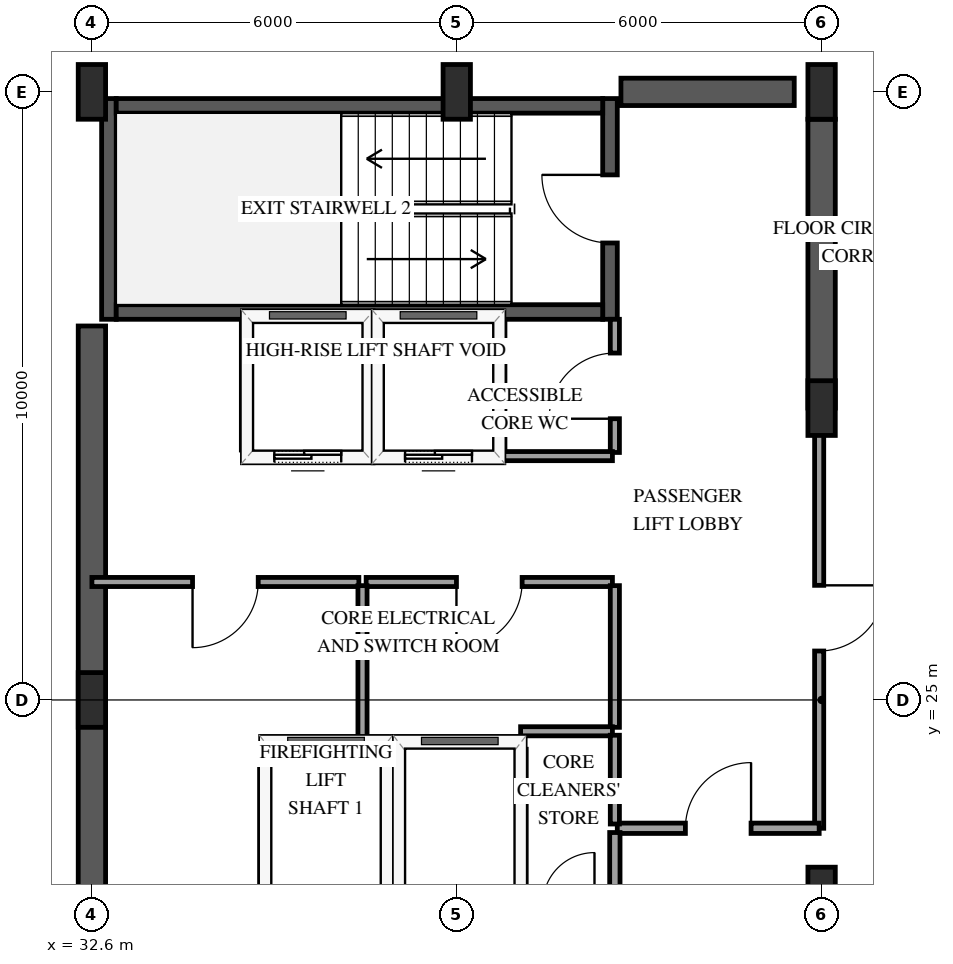
"""IFC4 building model, lengths in metres.
Left out: names, types, materials, properties, quantities, classifications, styles, units other than length and angle.
Written with IfcOpenShell. Run it as: python <this file> out.ifc"""

import sys

from ifc_helpers import new_model, si_unit, direction, frame, frame_2d, origin, origin_2d, place, context, subcontext, project, spatial, rectangle, extrude, element, fill, save


model = new_model("IFC4")
c1 = context("Model", 3, precision=1e-05, world=origin(), true_north=direction((0.0, 1.0)))
c2 = subcontext(c1, "Body", "Model", "MODEL_VIEW")
j1 = project(units=[si_unit("LENGTHUNIT", "METRE"), si_unit("PLANEANGLEUNIT", "RADIAN")], contexts=[c1])
p1 = place(None, origin())
s1 = spatial("IfcSite", under=j1, at=p1, CompositionType="ELEMENT")
p2 = place(p1, origin())
s2 = spatial("IfcBuilding", under=s1, at=p2, CompositionType="ELEMENT")
p3 = place(p2, frame((0.0, 0.0, 265.0)))
s3 = spatial("IfcBuildingStorey", under=s2, at=p3, CompositionType="ELEMENT", Elevation=265.0)
p4 = place(p3, frame((32.88, 31.26, 0.0), z_axis=(0.0, 0.0, 1.0), x_axis=(0.0, 1.0, 0.0)))
e1 = element("IfcWall", 1, at=p4, inside=s3, PredefinedType="SHEAR", context=c2, shape_type="SweptSolid", body=[
    extrude(rectangle(XDim=3.63, YDim=0.24, at=frame_2d((1.815, 0.0))), origin(), (0.0, 0.0, 1.0), 3.75),
])
p5 = place(p3, frame((41.12, 31.26, 0.0), z_axis=(0.0, 0.0, 1.0), x_axis=(0.0, 1.0, 0.0)))
e2 = element("IfcWall", 2, at=p5, inside=s3, PredefinedType="SHEAR", context=c2, shape_type="SweptSolid", body=[
    extrude(rectangle(XDim=3.63, YDim=0.24, at=frame_2d((1.815, 0.0))), origin(), (0.0, 0.0, 1.0), 3.75),
])
p6 = place(p5, frame((1.255, 0.0, 0.0)))
e3 = element("IfcOpeningElement", 3, at=p6, cuts=e2, PredefinedType="OPENING", context=c2, shape_type="SweptSolid", body=[
    extrude(rectangle(XDim=1.12, YDim=2.15, at=frame_2d((0.56, 1.075))), frame((0.0, 0.13, 0.0), z_axis=(0.0, -1.0, 0.0), x_axis=(1.0, 0.0, 0.0)), (0.0, 0.0, 1.0), 0.26),
])
for number, where, z_axis, x_axis in (
    (4, (33.0, 31.38, 0.0), (0.0, 0.0, 1.0), (1.0, 0.0, 0.0)),
    (5, (33.0, 34.77, 0.0), (0.0, 0.0, 1.0), (1.0, 0.0, 0.0)),
):
    element("IfcWall", number, at=place(p3, frame(where, z_axis=z_axis, x_axis=x_axis)), inside=s3, PredefinedType="SHEAR", context=c2, shape_type="SweptSolid", body=[
        extrude(rectangle(XDim=8.0, YDim=0.24, at=frame_2d((4.0, 0.0))), origin(), (0.0, 0.0, 1.0), 3.75),
    ])
p7 = place(p3, frame((32.6, 18.85, 0.0), z_axis=(0.0, 0.0, 1.0), x_axis=(0.0, 1.0, 0.0)))
e6 = element("IfcWall", 6, at=p7, inside=s3, PredefinedType="SHEAR", context=c2, shape_type="SweptSolid", body=[
    extrude(rectangle(XDim=12.3, YDim=0.45, at=frame_2d((6.15, 0.0))), origin(), (0.0, 0.0, 1.0), 3.75),
])
p8 = place(p3, frame((41.3, 35.0, 0.0), z_axis=(0.0, 0.0, 1.0), x_axis=(1.0, 0.0, 0.0)))
e7 = element("IfcWall", 7, at=p8, inside=s3, PredefinedType="SHEAR", context=c2, shape_type="SweptSolid", body=[
    extrude(rectangle(XDim=2.85, YDim=0.45, at=frame_2d((1.425, 0.0))), origin(), (0.0, 0.0, 1.0), 3.75),
])
p9 = place(p3, frame((44.6, 29.8, 0.0), z_axis=(0.0, 0.0, 1.0), x_axis=(0.0, 1.0, 0.0)))
e8 = element("IfcWall", 8, at=p9, inside=s3, PredefinedType="SHEAR", context=c2, shape_type="SweptSolid", body=[
    extrude(rectangle(XDim=4.75, YDim=0.45, at=frame_2d((2.375, 0.0))), origin(), (0.0, 0.0, 1.0), 3.75),
])
for number, where, z_axis, x_axis in (
    (9, (32.6, 25.0, 0.0), (0.0, 0.0, 1.0), (1.0, 0.0, 0.0)),
    (10, (32.6, 35.0, 0.0), (0.0, 0.0, 1.0), (1.0, 0.0, 0.0)),
    (11, (38.6, 35.0, 0.0), (0.0, 0.0, 1.0), (1.0, 0.0, 0.0)),
    (12, (44.6, 21.8, 0.0), (0.0, 0.0, 1.0), (1.0, 0.0, 0.0)),
    (13, (44.6, 29.8, 0.0), (0.0, 0.0, 1.0), (1.0, 0.0, 0.0)),
    (14, (44.6, 35.0, 0.0), (0.0, 0.0, 1.0), (1.0, 0.0, 0.0)),
):
    element("IfcColumn", number, at=place(p3, frame(where, z_axis=z_axis, x_axis=x_axis)), inside=s3, PredefinedType="PILASTER", context=c2, shape_type="SweptSolid", body=[
        extrude(rectangle(XDim=0.45, YDim=0.9, at=origin_2d()), origin(), (0.0, 0.0, 1.0), 3.75),
    ])
p10 = place(p3, frame((35.45, 24.3, 0.0), z_axis=(0.0, 0.0, 1.0), x_axis=(1.0, 0.0, 0.0)))
e15 = element("IfcWall", 15, at=p10, inside=s3, PredefinedType="SOLIDWALL", context=c2, shape_type="SweptSolid", body=[
    extrude(rectangle(XDim=2.0, YDim=0.185, at=frame_2d((1.0, 0.0))), origin(), (0.0, 0.0, 1.0), 3.45),
])
for number, where, z_axis, x_axis in (
    (16, (35.45, 21.81, 0.0), (0.0, 0.0, 1.0), (0.0, 1.0, 0.0)),
    (17, (37.45, 21.81, 0.0), (0.0, 0.0, 1.0), (0.0, 1.0, 0.0)),
):
    element("IfcWall", number, at=place(p3, frame(where, z_axis=z_axis, x_axis=x_axis)), inside=s3, PredefinedType="SOLIDWALL", context=c2, shape_type="SweptSolid", body=[
        extrude(rectangle(XDim=2.38, YDim=0.185, at=frame_2d((1.19, 0.0))), origin(), (0.0, 0.0, 1.0), 3.45),
    ])
p11 = place(p3, frame((37.65, 24.3, 0.0), z_axis=(0.0, 0.0, 1.0), x_axis=(1.0, 0.0, 0.0)))
e18 = element("IfcWall", 18, at=p11, inside=s3, PredefinedType="SOLIDWALL", context=c2, shape_type="SweptSolid", body=[
    extrude(rectangle(XDim=2.0, YDim=0.185, at=frame_2d((1.0, 0.0))), origin(), (0.0, 0.0, 1.0), 3.45),
])
p12 = place(p3, frame((39.65, 21.81, 0.0), z_axis=(0.0, 0.0, 1.0), x_axis=(0.0, 1.0, 0.0)))
e19 = element("IfcWall", 19, at=p12, inside=s3, PredefinedType="SOLIDWALL", context=c2, shape_type="SweptSolid", body=[
    extrude(rectangle(XDim=2.38, YDim=0.185, at=frame_2d((1.19, 0.0))), origin(), (0.0, 0.0, 1.0), 3.45),
])
p13 = place(p3, frame((35.15, 29.0, 0.0), z_axis=(0.0, 0.0, 1.0), x_axis=(1.0, 0.0, 0.0)))
e20 = element("IfcWall", 20, at=p13, inside=s3, PredefinedType="SOLIDWALL", context=c2, shape_type="SweptSolid", body=[
    extrude(rectangle(XDim=2.0, YDim=0.185, at=frame_2d((1.0, 0.0))), origin(), (0.0, 0.0, 1.0), 3.45),
])
p14 = place(p13, frame((0.45, 0.0, 0.0)))
e21 = element("IfcOpeningElement", 21, at=p14, cuts=e20, PredefinedType="OPENING", context=c2, shape_type="SweptSolid", body=[
    extrude(rectangle(XDim=1.1, YDim=2.15, at=frame_2d((0.55, 1.075))), frame((0.0, 0.103, 0.0), z_axis=(0.0, -1.0, 0.0), x_axis=(1.0, 0.0, 0.0)), (0.0, 0.0, 1.0), 0.205),
])
for number, where, z_axis, x_axis in (
    (22, (35.15, 29.11, 0.0), (0.0, 0.0, 1.0), (0.0, 1.0, 0.0)),
    (23, (37.15, 29.11, 0.0), (0.0, 0.0, 1.0), (0.0, 1.0, 0.0)),
):
    element("IfcWall", number, at=place(p3, frame(where, z_axis=z_axis, x_axis=x_axis)), inside=s3, PredefinedType="SOLIDWALL", context=c2, shape_type="SweptSolid", body=[
        extrude(rectangle(XDim=2.1, YDim=0.185, at=frame_2d((1.05, 0.0))), origin(), (0.0, 0.0, 1.0), 3.45),
    ])
p15 = place(p3, frame((37.3, 29.0, 0.0), z_axis=(0.0, 0.0, 1.0), x_axis=(1.0, 0.0, 0.0)))
e24 = element("IfcWall", 24, at=p15, inside=s3, PredefinedType="SOLIDWALL", context=c2, shape_type="SweptSolid", body=[
    extrude(rectangle(XDim=2.0, YDim=0.185, at=frame_2d((1.0, 0.0))), origin(), (0.0, 0.0, 1.0), 3.45),
])
p16 = place(p15, frame((0.45, 0.0, 0.0)))
e25 = element("IfcOpeningElement", 25, at=p16, cuts=e24, PredefinedType="OPENING", context=c2, shape_type="SweptSolid", body=[
    extrude(rectangle(XDim=1.1, YDim=2.15, at=frame_2d((0.55, 1.075))), frame((0.0, 0.103, 0.0), z_axis=(0.0, -1.0, 0.0), x_axis=(1.0, 0.0, 0.0)), (0.0, 0.0, 1.0), 0.205),
])
p17 = place(p3, frame((39.3, 29.11, 0.0), z_axis=(0.0, 0.0, 1.0), x_axis=(0.0, 1.0, 0.0)))
e26 = element("IfcWall", 26, at=p17, inside=s3, PredefinedType="SOLIDWALL", context=c2, shape_type="SweptSolid", body=[
    extrude(rectangle(XDim=2.1, YDim=0.185, at=frame_2d((1.05, 0.0))), origin(), (0.0, 0.0, 1.0), 3.45),
])
p18 = place(p3, frame((44.56, 29.8, 0.0), z_axis=(0.0, 0.0, 1.0), x_axis=(0.0, -1.0, 0.0)))
e27 = element("IfcWall", 27, at=p18, inside=s3, PredefinedType="PARTITIONING", context=c2, shape_type="SweptSolid", body=[
    extrude(rectangle(XDim=6.91, YDim=0.15, at=frame_2d((3.455, 0.0))), origin(), (0.0, 0.0, 1.0), 2.49),
])
p19 = place(p18, frame((2.915, 0.0, 0.0)))
e28 = element("IfcOpeningElement", 28, at=p19, cuts=e27, PredefinedType="OPENING", context=c2, shape_type="SweptSolid", body=[
    extrude(rectangle(XDim=1.08, YDim=2.15, at=frame_2d((0.54, 1.075))), frame((0.0, 0.085, 0.0), z_axis=(0.0, -1.0, 0.0), x_axis=(1.0, 0.0, 0.0)), (0.0, 0.0, 1.0), 0.17),
])
p20 = place(p3, frame((36.99, 26.94, 0.0), z_axis=(0.0, 0.0, 1.0), x_axis=(-1.0, 0.0, 0.0)))
e29 = element("IfcWall", 29, at=p20, inside=s3, PredefinedType="PARTITIONING", context=c2, shape_type="SweptSolid", body=[
    extrude(rectangle(XDim=4.39, YDim=0.15, at=frame_2d((2.195, 0.0))), origin(), (0.0, 0.0, 1.0), 3.45),
])
p21 = place(p20, frame((1.655, 0.0, 0.0)))
e30 = element("IfcOpeningElement", 30, at=p21, cuts=e29, PredefinedType="OPENING", context=c2, shape_type="SweptSolid", body=[
    extrude(rectangle(XDim=1.08, YDim=2.15, at=frame_2d((0.54, 1.075))), frame((0.0, 0.085, 0.0), z_axis=(0.0, -1.0, 0.0), x_axis=(1.0, 0.0, 0.0)), (0.0, 0.0, 1.0), 0.17),
])
p22 = place(p3, frame((41.16, 26.94, 0.0), z_axis=(0.0, 0.0, 1.0), x_axis=(-1.0, 0.0, 0.0)))
e31 = element("IfcWall", 31, at=p22, inside=s3, PredefinedType="PARTITIONING", context=c2, shape_type="SweptSolid", body=[
    extrude(rectangle(XDim=4.05, YDim=0.15, at=frame_2d((2.025, 0.0))), origin(), (0.0, 0.0, 1.0), 3.45),
])
p23 = place(p22, frame((1.485, 0.0, 0.0)))
e32 = element("IfcOpeningElement", 32, at=p23, cuts=e31, PredefinedType="OPENING", context=c2, shape_type="SweptSolid", body=[
    extrude(rectangle(XDim=1.08, YDim=2.15, at=frame_2d((0.54, 1.075))), frame((0.0, 0.085, 0.0), z_axis=(0.0, -1.0, 0.0), x_axis=(1.0, 0.0, 0.0)), (0.0, 0.0, 1.0), 0.17),
])
p24 = place(p3, frame((41.24, 22.89, 0.0), z_axis=(0.0, 0.0, 1.0), x_axis=(1.0, 0.0, 0.0)))
e33 = element("IfcWall", 33, at=p24, inside=s3, PredefinedType="PARTITIONING", context=c2, shape_type="SweptSolid", body=[
    extrude(rectangle(XDim=3.32, YDim=0.17, at=frame_2d((1.66, 0.0))), origin(), (0.0, 0.0, 1.0), 2.824),
])
p25 = place(p24, frame((1.12, 0.0, 0.0)))
e34 = element("IfcOpeningElement", 34, at=p25, cuts=e33, PredefinedType="OPENING", context=c2, shape_type="SweptSolid", body=[
    extrude(rectangle(XDim=1.08, YDim=2.15, at=frame_2d((0.54, 1.075))), frame((0.0, 0.095, 0.0), z_axis=(0.0, -1.0, 0.0), x_axis=(1.0, 0.0, 0.0)), (0.0, 0.0, 1.0), 0.19),
])
p26 = place(p3, frame((37.05, 26.88, 0.0), z_axis=(0.0, 0.0, 1.0), x_axis=(0.0, -1.0, 0.0)))
e35 = element("IfcWall", 35, at=p26, inside=s3, PredefinedType="PARTITIONING", context=c2, shape_type="SweptSolid", body=[
    extrude(rectangle(XDim=2.58, YDim=0.15, at=frame_2d((1.29, 0.0))), origin(), (0.0, 0.0, 1.0), 3.45),
])
p27 = place(p3, frame((41.2, 24.55, 0.0), z_axis=(0.0, 0.0, 1.0), x_axis=(0.0, 1.0, 0.0)))
e36 = element("IfcWall", 36, at=p27, inside=s3, PredefinedType="PARTITIONING", context=c2, shape_type="SweptSolid", body=[
    extrude(rectangle(XDim=2.33, YDim=0.15, at=frame_2d((1.165, 0.0))), origin(), (0.0, 0.0, 1.0), 3.45),
])
p28 = place(p3, frame((41.2, 29.07, 0.0), z_axis=(0.0, 0.0, 1.0), x_axis=(0.0, 1.0, 0.0)))
e37 = element("IfcWall", 37, at=p28, inside=s3, PredefinedType="PARTITIONING", context=c2, shape_type="SweptSolid", body=[
    extrude(rectangle(XDim=2.19, YDim=0.15, at=frame_2d((1.095, 0.0))), origin(), (0.0, 0.0, 1.0), 3.45),
])
p29 = place(p28, frame((0.555, 0.0, 0.0)))
e38 = element("IfcOpeningElement", 38, at=p29, cuts=e37, PredefinedType="OPENING", context=c2, shape_type="SweptSolid", body=[
    extrude(rectangle(XDim=1.08, YDim=2.15, at=frame_2d((0.54, 1.075))), frame((0.0, 0.085, 0.0), z_axis=(0.0, -1.0, 0.0), x_axis=(1.0, 0.0, 0.0)), (0.0, 0.0, 1.0), 0.17),
])
p30 = place(p3, frame((39.3, 29.01, 0.0), z_axis=(0.0, 0.0, 1.0), x_axis=(1.0, 0.0, 0.0)))
e39 = element("IfcWall", 39, at=p30, inside=s3, PredefinedType="PARTITIONING", context=c2, shape_type="SweptSolid", body=[
    extrude(rectangle(XDim=1.86, YDim=0.15, at=frame_2d((0.93, 0.0))), origin(), (0.0, 0.0, 1.0), 3.45),
])
p31 = place(p3, frame((39.65, 24.485, 0.0), z_axis=(0.0, 0.0, 1.0), x_axis=(1.0, 0.0, 0.0)))
e40 = element("IfcWall", 40, at=p31, inside=s3, PredefinedType="PARTITIONING", context=c2, shape_type="SweptSolid", body=[
    extrude(rectangle(XDim=1.51, YDim=0.15, at=frame_2d((0.755, 0.0))), origin(), (0.0, 0.0, 1.0), 3.45),
])
p32 = place(p3, frame((41.2, 22.96, 0.0), z_axis=(0.0, 0.0, 1.0), x_axis=(0.0, 1.0, 0.0)))
e41 = element("IfcWall", 41, at=p32, inside=s3, PredefinedType="PARTITIONING", context=c2, shape_type="SweptSolid", body=[
    extrude(rectangle(XDim=1.46, YDim=0.15, at=frame_2d((0.73, 0.0))), origin(), (0.0, 0.0, 1.0), 3.45),
])
p33 = place(p3, frame((41.2, 21.7, 0.0), z_axis=(0.0, 0.0, 1.0), x_axis=(0.0, 1.0, 0.0)))
e42 = element("IfcWall", 42, at=p33, inside=s3, PredefinedType="PARTITIONING", context=c2, shape_type="SweptSolid", body=[
    extrude(rectangle(XDim=1.12, YDim=0.17, at=frame_2d((0.56, 0.0))), origin(), (0.0, 0.0, 1.0), 3.45),
])
p34 = place(p14, origin())
e43 = element("IfcDoor", 43, at=p34, inside=s3, OperationType="SLIDING_TO_LEFT", PredefinedType="DOOR", context=c2, shape_type="SweptSolid", body=[
    extrude(rectangle(XDim=1.1, YDim=2.15, at=frame_2d((0.55, 1.075))), frame((0.0, 0.025, 0.0), z_axis=(0.0, -1.0, 0.0), x_axis=(1.0, 0.0, 0.0)), (0.0, 0.0, 1.0), 0.05),
])
fill(e21, e43)
p35 = place(p16, origin())
e44 = element("IfcDoor", 44, at=p35, inside=s3, OperationType="SLIDING_TO_LEFT", PredefinedType="DOOR", context=c2, shape_type="SweptSolid", body=[
    extrude(rectangle(XDim=1.1, YDim=2.15, at=frame_2d((0.55, 1.075))), frame((0.0, 0.025, 0.0), z_axis=(0.0, -1.0, 0.0), x_axis=(1.0, 0.0, 0.0)), (0.0, 0.0, 1.0), 0.05),
])
fill(e25, e44)
p36 = place(p6, origin())
e45 = element("IfcDoor", 45, at=p36, inside=s3, OperationType="SINGLE_SWING_RIGHT", PredefinedType="DOOR", context=c2, shape_type="SweptSolid", body=[
    extrude(rectangle(XDim=1.12, YDim=2.15, at=frame_2d((0.56, 1.075))), frame((0.0, 0.025, 0.0), z_axis=(0.0, -1.0, 0.0), x_axis=(1.0, 0.0, 0.0)), (0.0, 0.0, 1.0), 0.05),
])
fill(e3, e45)
p37 = place(p19, origin())
e46 = element("IfcDoor", 46, at=p37, inside=s3, OperationType="SINGLE_SWING_LEFT", PredefinedType="DOOR", context=c2, shape_type="SweptSolid", body=[
    extrude(rectangle(XDim=1.08, YDim=2.15, at=frame_2d((0.54, 1.075))), frame((0.0, 0.025, 0.0), z_axis=(0.0, -1.0, 0.0), x_axis=(1.0, 0.0, 0.0)), (0.0, 0.0, 1.0), 0.05),
])
fill(e28, e46)
p38 = place(p21, origin())
e47 = element("IfcDoor", 47, at=p38, inside=s3, OperationType="SINGLE_SWING_RIGHT", PredefinedType="DOOR", context=c2, shape_type="SweptSolid", body=[
    extrude(rectangle(XDim=1.08, YDim=2.15, at=frame_2d((0.54, 1.075))), frame((0.0, 0.025, 0.0), z_axis=(0.0, -1.0, 0.0), x_axis=(1.0, 0.0, 0.0)), (0.0, 0.0, 1.0), 0.05),
])
fill(e30, e47)
p39 = place(p23, origin())
e48 = element("IfcDoor", 48, at=p39, inside=s3, OperationType="SINGLE_SWING_RIGHT", PredefinedType="DOOR", context=c2, shape_type="SweptSolid", body=[
    extrude(rectangle(XDim=1.08, YDim=2.15, at=frame_2d((0.54, 1.075))), frame((0.0, 0.025, 0.0), z_axis=(0.0, -1.0, 0.0), x_axis=(1.0, 0.0, 0.0)), (0.0, 0.0, 1.0), 0.05),
])
fill(e32, e48)
p40 = place(p25, origin())
e49 = element("IfcDoor", 49, at=p40, inside=s3, OperationType="SINGLE_SWING_RIGHT", PredefinedType="DOOR", context=c2, shape_type="SweptSolid", body=[
    extrude(rectangle(XDim=1.08, YDim=2.15, at=frame_2d((0.54, 1.075))), frame((0.0, 0.025, 0.0), z_axis=(0.0, -1.0, 0.0), x_axis=(1.0, 0.0, 0.0)), (0.0, 0.0, 1.0), 0.05),
])
fill(e34, e49)
p41 = place(p29, origin())
e50 = element("IfcDoor", 50, at=p41, inside=s3, OperationType="SINGLE_SWING_LEFT", PredefinedType="DOOR", context=c2, shape_type="SweptSolid", body=[
    extrude(rectangle(XDim=1.08, YDim=2.15, at=frame_2d((0.54, 1.075))), frame((0.0, 0.025, 0.0), z_axis=(0.0, -1.0, 0.0), x_axis=(1.0, 0.0, 0.0)), (0.0, 0.0, 1.0), 0.05),
])
fill(e38, e50)
save(model, sys.argv[1])
